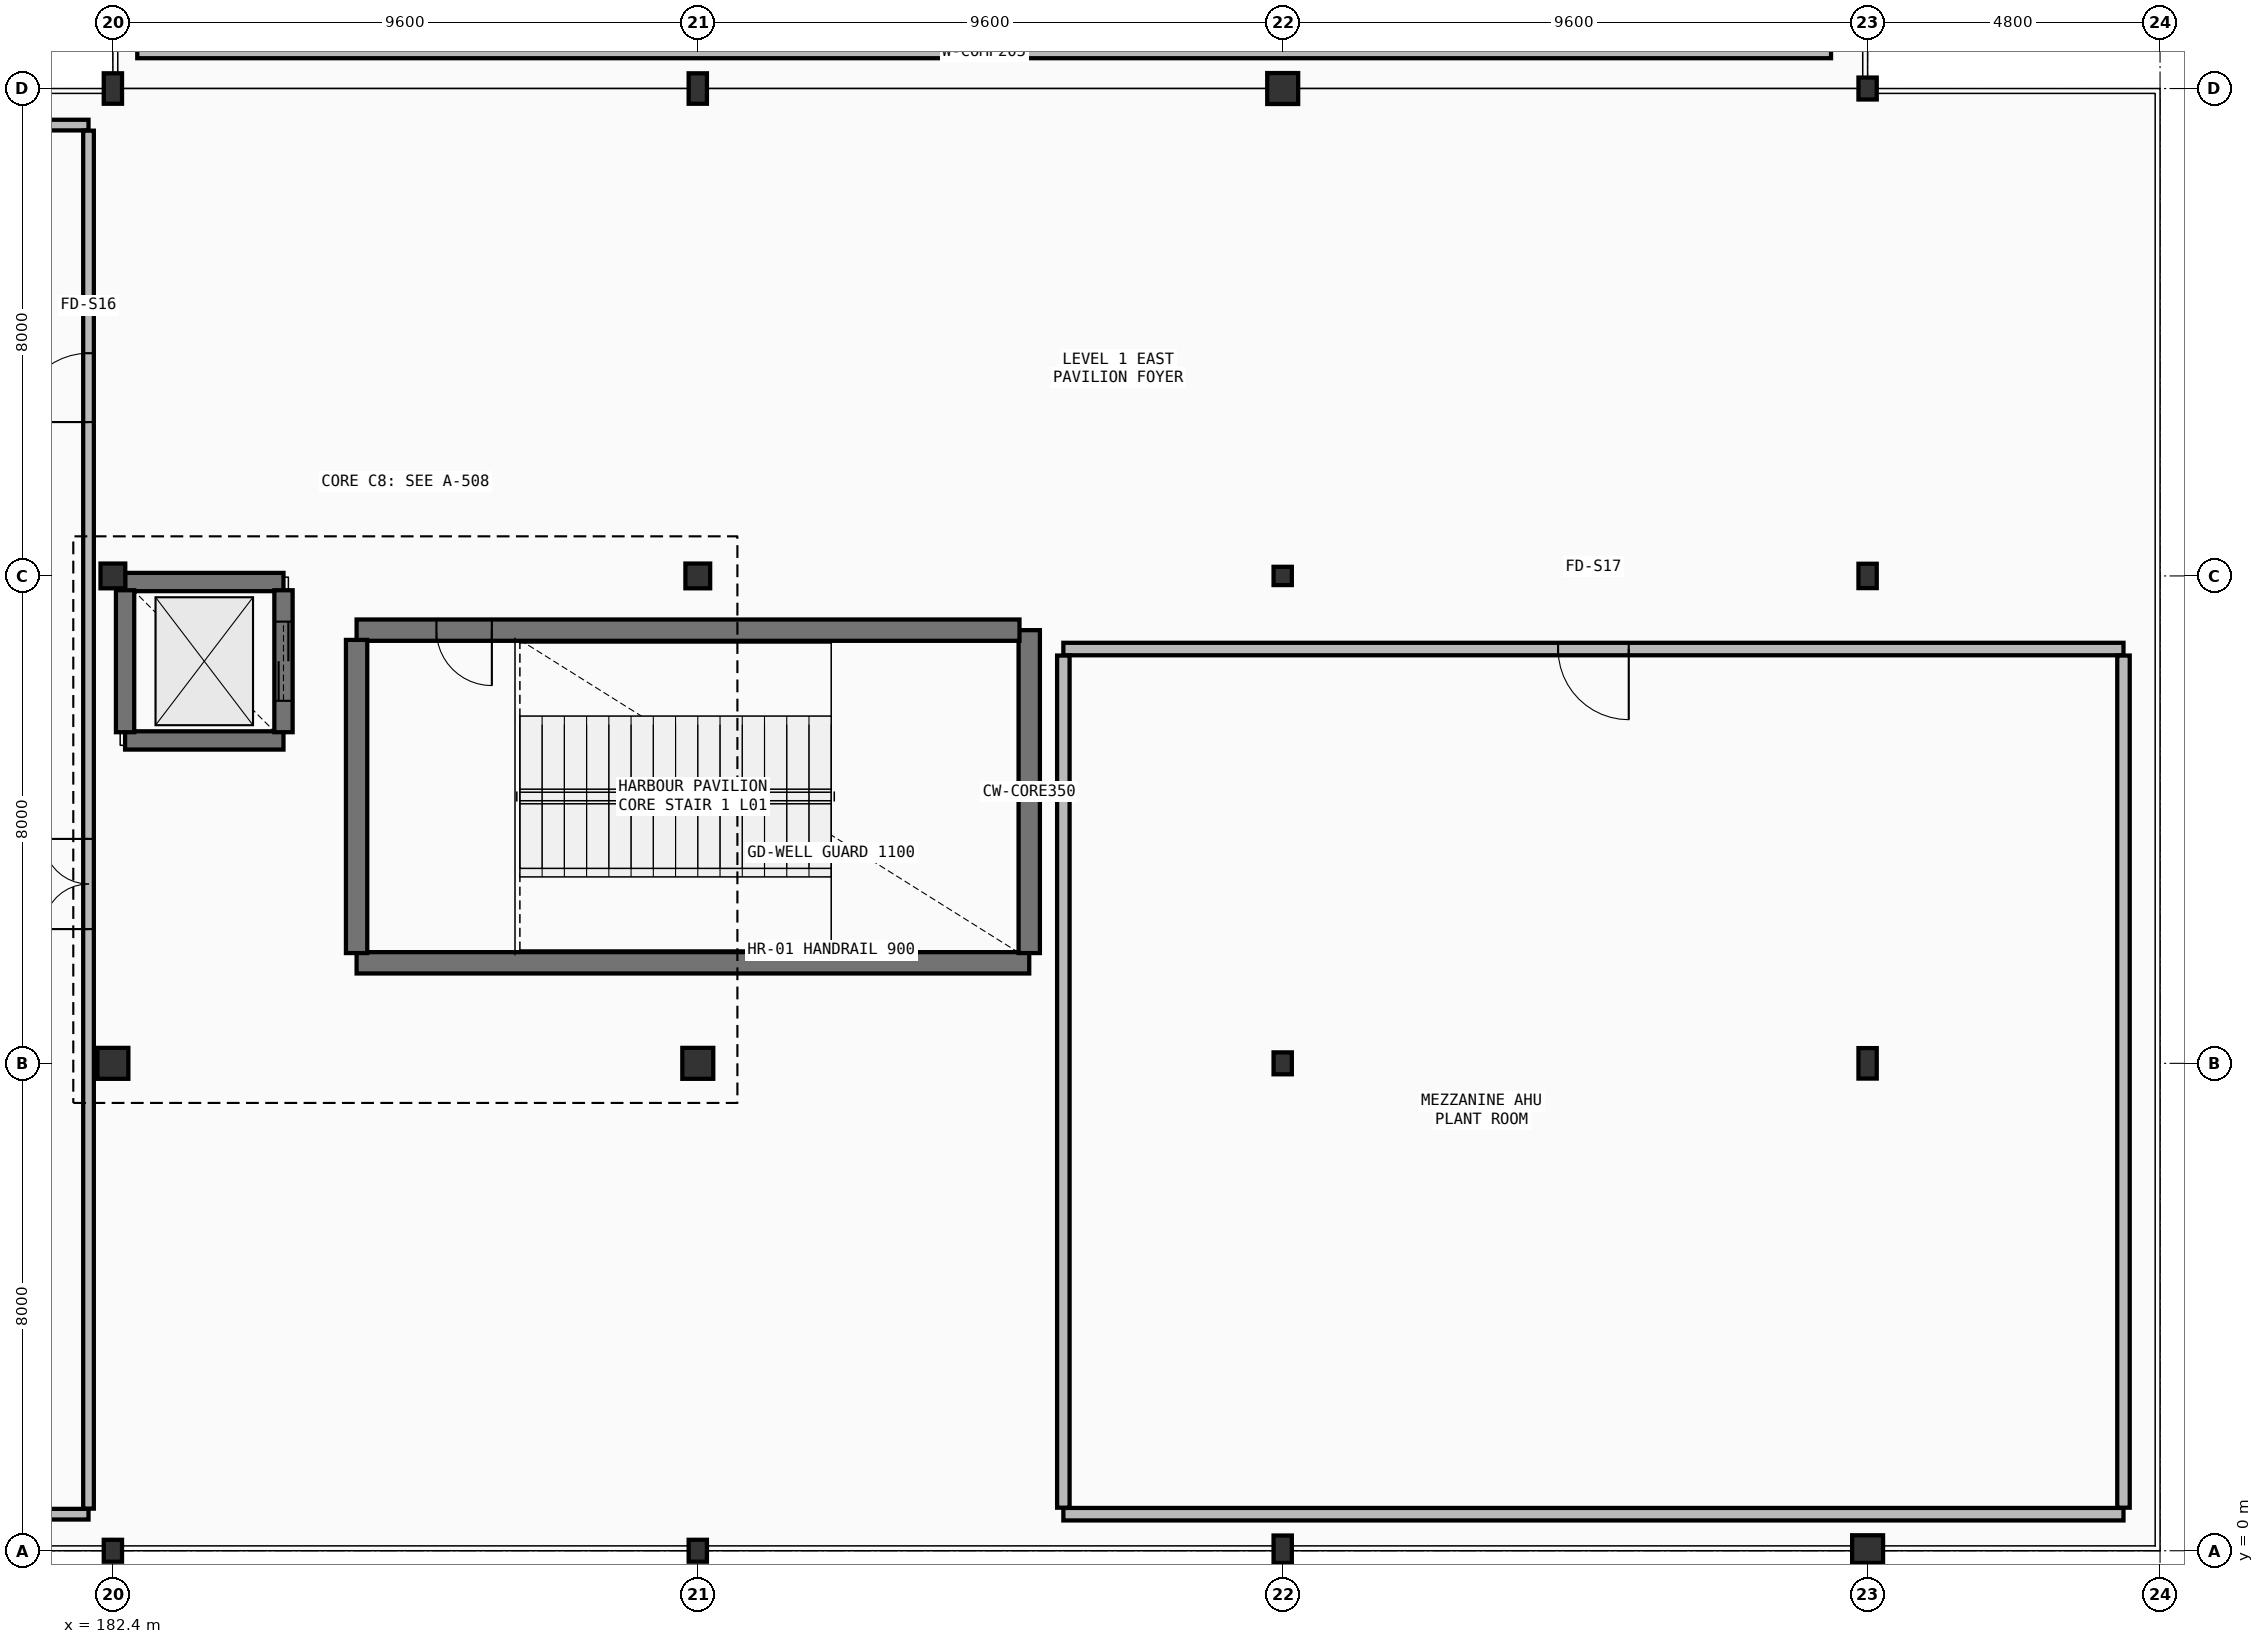
"""IFC4 building model, lengths in metres.
Left out: names, types, materials, properties, quantities, classifications, styles, units other than length and angle.
Written with IfcOpenShell. Run it as: python <this file> out.ifc"""

import sys

from ifc_helpers import new_model, si_unit, direction, frame, frame_2d, origin, origin_2d, place, context, subcontext, project, spatial, rectangle, hollow_circle, i_section, extrude, element, fill, save


model = new_model("IFC4")
c1 = context("Model", 3, precision=1e-05, world=origin(), true_north=direction((0.0, 1.0)))
c2 = subcontext(c1, "Body", "Model", "MODEL_VIEW")
j1 = project(units=[si_unit("LENGTHUNIT", "METRE"), si_unit("PLANEANGLEUNIT", "RADIAN")], contexts=[c1])
p1 = place(None, origin())
s1 = spatial("IfcSite", under=j1, at=p1, CompositionType="ELEMENT")
p2 = place(p1, origin())
s2 = spatial("IfcBuilding", under=s1, at=p2, CompositionType="ELEMENT")
p3 = place(p2, frame((0.0, 0.0, 6.0)))
s3 = spatial("IfcBuildingStorey", under=s2, at=p3, CompositionType="ELEMENT", Elevation=6.0)
p4 = place(p3, frame((182.4, 0.0, 0.0), z_axis=(0.0, 0.0, 1.0), x_axis=(1.0, 0.0, 0.0)))
e1 = element("IfcColumn", 1, at=p4, inside=s3, PredefinedType="COLUMN", context=c2, shape_type="SweptSolid", body=[
    extrude(i_section(OverallWidth=0.3, OverallDepth=0.36, WebThickness=0.012, FlangeThickness=0.022, FilletRadius=0.027, at=origin_2d()), origin(), (0.0, 0.0, 1.0), 5.4),
])
p5 = place(p3, frame((182.4, 8.0, 0.0), z_axis=(0.0, 0.0, 1.0), x_axis=(1.0, 0.0, 0.0)))
e2 = element("IfcColumn", 2, at=p5, inside=s3, PredefinedType="COLUMN", context=c2, shape_type="SweptSolid", body=[
    extrude(hollow_circle(Radius=0.254, WallThickness=0.025, at=origin_2d()), origin(), (0.0, 0.0, 1.0), 5.4),
])
p6 = place(p3, frame((182.4, 16.0, 0.0), z_axis=(0.0, 0.0, 1.0), x_axis=(1.0, 0.0, 0.0)))
e3 = element("IfcColumn", 3, at=p6, inside=s3, PredefinedType="COLUMN", context=c2, shape_type="SweptSolid", body=[
    extrude(hollow_circle(Radius=0.203, WallThickness=0.02, at=origin_2d()), origin(), (0.0, 0.0, 1.0), 5.4),
])
p7 = place(p3, frame((182.4, 24.0, 0.0), z_axis=(0.0, 0.0, 1.0), x_axis=(1.0, 0.0, 0.0)))
e4 = element("IfcColumn", 4, at=p7, inside=s3, PredefinedType="COLUMN", context=c2, shape_type="SweptSolid", body=[
    extrude(i_section(OverallWidth=0.3, OverallDepth=0.5, WebThickness=0.014, FlangeThickness=0.028, FilletRadius=0.027, at=origin_2d()), origin(), (0.0, 0.0, 1.0), 5.4),
])
p8 = place(p3, frame((192.0, 0.0, 0.0), z_axis=(0.0, 0.0, 1.0), x_axis=(1.0, 0.0, 0.0)))
e5 = element("IfcColumn", 5, at=p8, inside=s3, PredefinedType="COLUMN", context=c2, shape_type="SweptSolid", body=[
    extrude(i_section(OverallWidth=0.3, OverallDepth=0.36, WebThickness=0.012, FlangeThickness=0.022, FilletRadius=0.027, at=origin_2d()), origin(), (0.0, 0.0, 1.0), 5.4),
])
p9 = place(p3, frame((192.0, 8.0, 0.0), z_axis=(0.0, 0.0, 1.0), x_axis=(1.0, 0.0, 0.0)))
e6 = element("IfcColumn", 6, at=p9, inside=s3, PredefinedType="COLUMN", context=c2, shape_type="SweptSolid", body=[
    extrude(hollow_circle(Radius=0.254, WallThickness=0.025, at=origin_2d()), origin(), (0.0, 0.0, 1.0), 5.4),
])
p10 = place(p3, frame((192.0, 16.0, 0.0), z_axis=(0.0, 0.0, 1.0), x_axis=(1.0, 0.0, 0.0)))
e7 = element("IfcColumn", 7, at=p10, inside=s3, PredefinedType="COLUMN", context=c2, shape_type="SweptSolid", body=[
    extrude(hollow_circle(Radius=0.203, WallThickness=0.02, at=origin_2d()), origin(), (0.0, 0.0, 1.0), 5.4),
])
for number, where, z_axis, x_axis in (
    (8, (192.0, 24.0, 0.0), (0.0, 0.0, 1.0), (1.0, 0.0, 0.0)),
    (9, (201.6, 0.0, 0.0), (0.0, 0.0, 1.0), (1.0, 0.0, 0.0)),
):
    element("IfcColumn", number, at=place(p3, frame(where, z_axis=z_axis, x_axis=x_axis)), inside=s3, PredefinedType="COLUMN", context=c2, shape_type="SweptSolid", body=[
        extrude(i_section(OverallWidth=0.3, OverallDepth=0.5, WebThickness=0.014, FlangeThickness=0.028, FilletRadius=0.027, at=origin_2d()), origin(), (0.0, 0.0, 1.0), 5.4),
    ])
p11 = place(p3, frame((201.6, 8.0, 0.0), z_axis=(0.0, 0.0, 1.0), x_axis=(1.0, 0.0, 0.0)))
e10 = element("IfcColumn", 10, at=p11, inside=s3, PredefinedType="COLUMN", context=c2, shape_type="SweptSolid", body=[
    extrude(i_section(OverallWidth=0.3, OverallDepth=0.36, WebThickness=0.012, FlangeThickness=0.022, FilletRadius=0.027, at=origin_2d()), origin(), (0.0, 0.0, 1.0), 5.4),
])
p12 = place(p3, frame((201.6, 16.0, 0.0), z_axis=(0.0, 0.0, 1.0), x_axis=(1.0, 0.0, 0.0)))
e11 = element("IfcColumn", 11, at=p12, inside=s3, PredefinedType="COLUMN", context=c2, shape_type="SweptSolid", body=[
    extrude(i_section(OverallWidth=0.3, OverallDepth=0.3, WebThickness=0.011, FlangeThickness=0.019, FilletRadius=0.027, at=origin_2d()), origin(), (0.0, 0.0, 1.0), 5.4),
])
for number, where, z_axis, x_axis in (
    (12, (201.6, 24.0, 0.0), (0.0, 0.0, 1.0), (1.0, 0.0, 0.0)),
    (13, (211.2, 0.0, 0.0), (0.0, 0.0, 1.0), (1.0, 0.0, 0.0)),
):
    element("IfcColumn", number, at=place(p3, frame(where, z_axis=z_axis, x_axis=x_axis)), inside=s3, PredefinedType="COLUMN", context=c2, shape_type="SweptSolid", body=[
        extrude(hollow_circle(Radius=0.254, WallThickness=0.025, at=origin_2d()), origin(), (0.0, 0.0, 1.0), 5.4),
    ])
p13 = place(p3, frame((211.2, 8.0, 0.0), z_axis=(0.0, 0.0, 1.0), x_axis=(1.0, 0.0, 0.0)))
e14 = element("IfcColumn", 14, at=p13, inside=s3, PredefinedType="COLUMN", context=c2, shape_type="SweptSolid", body=[
    extrude(i_section(OverallWidth=0.3, OverallDepth=0.5, WebThickness=0.014, FlangeThickness=0.028, FilletRadius=0.027, at=origin_2d()), origin(), (0.0, 0.0, 1.0), 5.4),
])
p14 = place(p3, frame((211.2, 16.0, 0.0), z_axis=(0.0, 0.0, 1.0), x_axis=(1.0, 0.0, 0.0)))
e15 = element("IfcColumn", 15, at=p14, inside=s3, PredefinedType="COLUMN", context=c2, shape_type="SweptSolid", body=[
    extrude(i_section(OverallWidth=0.3, OverallDepth=0.4, WebThickness=0.013, FlangeThickness=0.024, FilletRadius=0.027, at=origin_2d()), origin(), (0.0, 0.0, 1.0), 5.4),
])
p15 = place(p3, frame((211.2, 24.0, 0.0), z_axis=(0.0, 0.0, 1.0), x_axis=(1.0, 0.0, 0.0)))
e16 = element("IfcColumn", 16, at=p15, inside=s3, PredefinedType="COLUMN", context=c2, shape_type="SweptSolid", body=[
    extrude(i_section(OverallWidth=0.3, OverallDepth=0.36, WebThickness=0.012, FlangeThickness=0.022, FilletRadius=0.027, at=origin_2d()), origin(), (0.0, 0.0, 1.0), 5.4),
])
p16 = place(p3, frame((186.4, 9.65, 0.0), z_axis=(0.0, 0.0, 1.0), x_axis=(1.0, 0.0, 0.0)))
e17 = element("IfcWall", 17, at=p16, inside=s3, PredefinedType="SHEAR", context=c2, shape_type="SweptSolid", body=[
    extrude(rectangle(XDim=11.04, YDim=0.35, at=frame_2d((5.52, 0.0))), origin(), (0.0, 0.0, 1.0), 5.17),
])
p17 = place(p3, frame((197.44, 9.81, 0.0), z_axis=(0.0, 0.0, 1.0), x_axis=(0.0, 1.0, 0.0)))
e18 = element("IfcWall", 18, at=p17, inside=s3, PredefinedType="SHEAR", context=c2, shape_type="SweptSolid", body=[
    extrude(rectangle(XDim=5.3, YDim=0.35, at=frame_2d((2.65, 0.0))), origin(), (0.0, 0.0, 1.0), 5.17),
])
p18 = place(p3, frame((197.28, 15.11, 0.0), z_axis=(0.0, 0.0, 1.0), x_axis=(-1.0, 0.0, 0.0)))
e19 = element("IfcWall", 19, at=p18, inside=s3, PredefinedType="SHEAR", context=c2, shape_type="SweptSolid", body=[
    extrude(rectangle(XDim=10.88, YDim=0.35, at=frame_2d((5.44, 0.0))), origin(), (0.0, 0.0, 1.0), 5.17),
])
p19 = place(p18, frame((8.66, 0.0, 0.0)))
e20 = element("IfcOpeningElement", 20, at=p19, cuts=e19, PredefinedType="OPENING", context=c2, shape_type="SweptSolid", body=[
    extrude(rectangle(XDim=0.91, YDim=2.08, at=frame_2d((0.455, 1.04))), frame((0.0, 0.185, 0.0), z_axis=(0.0, -1.0, 0.0), x_axis=(1.0, 0.0, 0.0)), (0.0, 0.0, 1.0), 0.37),
])
p20 = place(p3, frame((186.4, 14.95, 0.0), z_axis=(0.0, 0.0, 1.0), x_axis=(0.0, -1.0, 0.0)))
e21 = element("IfcWall", 21, at=p20, inside=s3, PredefinedType="SHEAR", context=c2, shape_type="SweptSolid", body=[
    extrude(rectangle(XDim=5.14, YDim=0.35, at=frame_2d((2.57, 0.0))), origin(), (0.0, 0.0, 1.0), 5.17),
])
for number, where, z_axis, x_axis in (
    (22, (185.2, 15.9, 0.0), (0.0, 0.0, 1.0), (-1.0, 0.0, 0.0)),
    (23, (182.6, 13.3, 0.0), (0.0, 0.0, 1.0), (1.0, 0.0, 0.0)),
):
    element("IfcWall", number, at=place(p3, frame(where, z_axis=z_axis, x_axis=x_axis)), inside=s3, PredefinedType="SHEAR", context=c2, shape_type="SweptSolid", body=[
        extrude(rectangle(XDim=2.6, YDim=0.3, at=frame_2d((1.3, 0.0))), origin(), (0.0, 0.0, 1.0), 5.17),
    ])
p21 = place(p3, frame((185.2, 13.435, 0.0), z_axis=(0.0, 0.0, 1.0), x_axis=(0.0, 1.0, 0.0)))
e24 = element("IfcWall", 24, at=p21, inside=s3, PredefinedType="SHEAR", context=c2, shape_type="SweptSolid", body=[
    extrude(rectangle(XDim=2.33, YDim=0.3, at=frame_2d((1.165, 0.0))), origin(), (0.0, 0.0, 1.0), 5.17),
])
p22 = place(p21, frame((0.515, 0.0, 0.0)))
e25 = element("IfcOpeningElement", 25, at=p22, cuts=e24, PredefinedType="OPENING", context=c2, shape_type="SweptSolid", body=[
    extrude(rectangle(XDim=1.3, YDim=2.22, at=frame_2d((0.65, 1.11))), frame((0.0, 0.16, 0.0), z_axis=(0.0, -1.0, 0.0), x_axis=(1.0, 0.0, 0.0)), (0.0, 0.0, 1.0), 0.32),
])
p23 = place(p3, frame((182.6, 15.765, 0.0), z_axis=(0.0, 0.0, 1.0), x_axis=(0.0, -1.0, 0.0)))
e26 = element("IfcWall", 26, at=p23, inside=s3, PredefinedType="SHEAR", context=c2, shape_type="SweptSolid", body=[
    extrude(rectangle(XDim=2.33, YDim=0.3, at=frame_2d((1.165, 0.0))), origin(), (0.0, 0.0, 1.0), 5.17),
])
p24 = place(p3, frame((182.8, 24.6, 0.0), z_axis=(0.0, 0.0, 1.0), x_axis=(1.0, 0.0, 0.0)))
e27 = element("IfcWall", 27, at=p24, inside=s3, PredefinedType="SOLIDWALL", context=c2, shape_type="SweptSolid", body=[
    extrude(rectangle(XDim=27.8, YDim=0.205, at=frame_2d((13.9, 0.0))), origin(), (0.0, 0.0, 1.0), 4.54),
])
p25 = place(p3, frame((182.0, 23.4, 0.0), z_axis=(0.0, 0.0, 1.0), x_axis=(-1.0, 0.0, 0.0)))
e28 = element("IfcWall", 28, at=p25, inside=s3, PredefinedType="PARTITIONING", context=c2, shape_type="SweptSolid", body=[
    extrude(rectangle(XDim=37.6, YDim=0.175, at=frame_2d((18.8, 0.0))), origin(), (0.0, 0.0, 1.0), 4.54),
])
p26 = place(p3, frame((144.4, 0.6, 0.0), z_axis=(0.0, 0.0, 1.0), x_axis=(1.0, 0.0, 0.0)))
e29 = element("IfcWall", 29, at=p26, inside=s3, PredefinedType="PARTITIONING", context=c2, shape_type="SweptSolid", body=[
    extrude(rectangle(XDim=37.6, YDim=0.175, at=frame_2d((18.8, 0.0))), origin(), (0.0, 0.0, 1.0), 4.74),
])
p27 = place(p3, frame((182.0, 0.691, 0.0), z_axis=(0.0, 0.0, 1.0), x_axis=(0.0, 1.0, 0.0)))
e30 = element("IfcWall", 30, at=p27, inside=s3, PredefinedType="PARTITIONING", context=c2, shape_type="SweptSolid", body=[
    extrude(rectangle(XDim=22.617, YDim=0.175, at=frame_2d((11.309, 0.0))), origin(), (0.0, 0.0, 1.0), 4.59),
])
p28 = place(p27, frame((9.512, 0.0, 0.0)))
e31 = element("IfcOpeningElement", 31, at=p28, cuts=e30, PredefinedType="OPENING", context=c2, shape_type="SweptSolid", body=[
    extrude(rectangle(XDim=1.48, YDim=2.16, at=frame_2d((0.74, 1.08))), frame((0.0, 0.097, 0.0), z_axis=(0.0, -1.0, 0.0), x_axis=(1.0, 0.0, 0.0)), (0.0, 0.0, 1.0), 0.195),
])
p29 = place(p27, frame((17.834, 0.0, 0.0)))
e32 = element("IfcOpeningElement", 32, at=p29, cuts=e30, PredefinedType="OPENING", context=c2, shape_type="SweptSolid", body=[
    extrude(rectangle(XDim=1.13, YDim=2.3, at=frame_2d((0.565, 1.15))), frame((0.0, 0.097, 0.0), z_axis=(0.0, -1.0, 0.0), x_axis=(1.0, 0.0, 0.0)), (0.0, 0.0, 1.0), 0.195),
])
p30 = place(p3, frame((215.4, 14.8, 0.0), z_axis=(0.0, 0.0, 1.0), x_axis=(-1.0, 0.0, 0.0)))
e33 = element("IfcWall", 33, at=p30, inside=s3, PredefinedType="SOLIDWALL", context=c2, shape_type="SweptSolid", body=[
    extrude(rectangle(XDim=17.4, YDim=0.205, at=frame_2d((8.7, 0.0))), origin(), (0.0, 0.0, 1.0), 4.44),
])
p31 = place(p30, frame((8.12, 0.0, 0.0)))
e34 = element("IfcOpeningElement", 34, at=p31, cuts=e33, PredefinedType="OPENING", context=c2, shape_type="SweptSolid", body=[
    extrude(rectangle(XDim=1.16, YDim=2.32, at=frame_2d((0.58, 1.16))), frame((0.0, 0.113, 0.0), z_axis=(0.0, -1.0, 0.0), x_axis=(1.0, 0.0, 0.0)), (0.0, 0.0, 1.0), 0.225),
])
p32 = place(p3, frame((198.0, 0.6, 0.0), z_axis=(0.0, 0.0, 1.0), x_axis=(1.0, 0.0, 0.0)))
e35 = element("IfcWall", 35, at=p32, inside=s3, PredefinedType="SOLIDWALL", context=c2, shape_type="SweptSolid", body=[
    extrude(rectangle(XDim=17.4, YDim=0.205, at=frame_2d((8.7, 0.0))), origin(), (0.0, 0.0, 1.0), 4.24),
])
p33 = place(p3, frame((215.4, 0.707, 0.0), z_axis=(0.0, 0.0, 1.0), x_axis=(0.0, 1.0, 0.0)))
e36 = element("IfcWall", 36, at=p33, inside=s3, PredefinedType="SOLIDWALL", context=c2, shape_type="SweptSolid", body=[
    extrude(rectangle(XDim=13.987, YDim=0.205, at=frame_2d((6.994, 0.0))), origin(), (0.0, 0.0, 1.0), 5.4),
])
p34 = place(p3, frame((198.0, 14.694, 0.0), z_axis=(0.0, 0.0, 1.0), x_axis=(0.0, -1.0, 0.0)))
e37 = element("IfcWall", 37, at=p34, inside=s3, PredefinedType="SOLIDWALL", context=c2, shape_type="SweptSolid", body=[
    extrude(rectangle(XDim=13.987, YDim=0.205, at=frame_2d((6.994, 0.0))), origin(), (0.0, 0.0, 1.0), 4.34),
])
p35 = place(p19, origin())
e38 = element("IfcDoor", 38, at=p35, inside=s3, OperationType="SINGLE_SWING_LEFT", PredefinedType="DOOR", context=c2, shape_type="SweptSolid", body=[
    extrude(rectangle(XDim=0.91, YDim=2.08, at=frame_2d((0.455, 1.04))), frame((0.0, 0.025, 0.0), z_axis=(0.0, -1.0, 0.0), x_axis=(1.0, 0.0, 0.0)), (0.0, 0.0, 1.0), 0.05),
])
fill(e20, e38)
p36 = place(p22, origin())
e39 = element("IfcDoor", 39, at=p36, inside=s3, OperationType="DOUBLE_DOOR_SLIDING", PredefinedType="DOOR", context=c2, shape_type="SweptSolid", body=[
    extrude(rectangle(XDim=1.3, YDim=2.22, at=frame_2d((0.65, 1.11))), frame((0.0, 0.025, 0.0), z_axis=(0.0, -1.0, 0.0), x_axis=(1.0, 0.0, 0.0)), (0.0, 0.0, 1.0), 0.05),
])
fill(e25, e39)
p37 = place(p28, origin())
e40 = element("IfcDoor", 40, at=p37, inside=s3, OperationType="DOUBLE_DOOR_SINGLE_SWING", PredefinedType="DOOR", context=c2, shape_type="SweptSolid", body=[
    extrude(rectangle(XDim=1.48, YDim=2.16, at=frame_2d((0.74, 1.08))), frame((0.0, 0.025, 0.0), z_axis=(0.0, -1.0, 0.0), x_axis=(1.0, 0.0, 0.0)), (0.0, 0.0, 1.0), 0.05),
])
fill(e31, e40)
p38 = place(p29, origin())
e41 = element("IfcDoor", 41, at=p38, inside=s3, OperationType="SINGLE_SWING_LEFT", PredefinedType="DOOR", context=c2, shape_type="SweptSolid", body=[
    extrude(rectangle(XDim=1.13, YDim=2.3, at=frame_2d((0.565, 1.15))), frame((0.0, 0.025, 0.0), z_axis=(0.0, -1.0, 0.0), x_axis=(1.0, 0.0, 0.0)), (0.0, 0.0, 1.0), 0.05),
])
fill(e32, e41)
p39 = place(p31, origin())
e42 = element("IfcDoor", 42, at=p39, inside=s3, OperationType="SINGLE_SWING_RIGHT", PredefinedType="DOOR", context=c2, shape_type="SweptSolid", body=[
    extrude(rectangle(XDim=1.16, YDim=2.32, at=frame_2d((0.58, 1.16))), frame((0.0, 0.025, 0.0), z_axis=(0.0, -1.0, 0.0), x_axis=(1.0, 0.0, 0.0)), (0.0, 0.0, 1.0), 0.05),
])
fill(e34, e42)
save(model, sys.argv[1])
